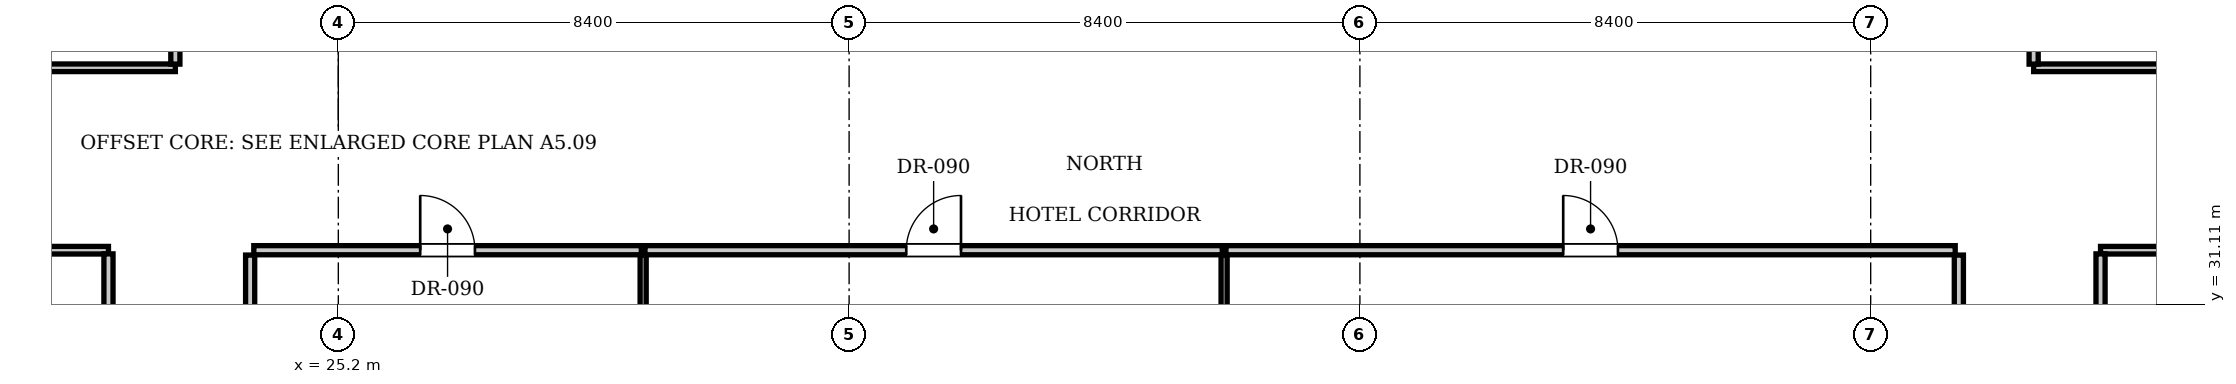
"""IFC4 building model, lengths in metres.
Left out: names, types, materials, properties, quantities, classifications, styles, units other than length and angle.
Written with IfcOpenShell. Run it as: python <this file> out.ifc"""

import sys

from ifc_helpers import new_model, si_unit, direction, frame, frame_2d, origin, place, context, subcontext, project, spatial, rectangle, extrude, element, fill, save


model = new_model("IFC4")
c1 = context("Model", 3, precision=1e-05, world=origin(), true_north=direction((0.0, 1.0)))
c2 = subcontext(c1, "Body", "Model", "MODEL_VIEW")
j1 = project(units=[si_unit("LENGTHUNIT", "METRE"), si_unit("PLANEANGLEUNIT", "RADIAN")], contexts=[c1])
p1 = place(None, origin())
s1 = spatial("IfcSite", under=j1, at=p1, CompositionType="ELEMENT")
p2 = place(p1, origin())
s2 = spatial("IfcBuilding", under=s1, at=p2, CompositionType="ELEMENT")
p3 = place(p2, frame((0.0, 0.0, 111.65)))
s3 = spatial("IfcBuildingStorey", under=s2, at=p3, CompositionType="ELEMENT", Elevation=111.65)
for number, where, z_axis, x_axis in (
    (1, (23.75, 24.19, 0.0), (0.0, 0.0, 1.0), (0.0, 1.0, 0.0)),
    (2, (51.85, 24.19, 0.0), (0.0, 0.0, 1.0), (0.0, 1.0, 0.0)),
):
    element("IfcWall", number, at=place(p3, frame(where, z_axis=z_axis, x_axis=x_axis)), inside=s3, PredefinedType="PARTITIONING", context=c2, shape_type="SweptSolid", body=[
        extrude(rectangle(XDim=7.73, YDim=0.15, at=frame_2d((3.865, 0.0))), origin(), (0.0, 0.0, 1.0), 3.55),
    ])
p4 = place(p3, frame((23.81, 32.0, 0.0), z_axis=(0.0, 0.0, 1.0), x_axis=(1.0, 0.0, 0.0)))
e3 = element("IfcWall", 3, at=p4, inside=s3, PredefinedType="PARTITIONING", context=c2, shape_type="SweptSolid", body=[
    extrude(rectangle(XDim=6.373, YDim=0.15, at=frame_2d((3.187, 0.0))), origin(), (0.0, 0.0, 1.0), 3.55),
])
p5 = place(p4, frame((2.737, 0.0, 0.0)))
e4 = element("IfcOpeningElement", 4, at=p5, cuts=e3, PredefinedType="OPENING", context=c2, shape_type="SweptSolid", body=[
    extrude(rectangle(XDim=0.9, YDim=2.1, at=frame_2d((0.45, 1.05))), frame((0.0, 0.085, 0.0), z_axis=(0.0, -1.0, 0.0), x_axis=(1.0, 0.0, 0.0)), (0.0, 0.0, 1.0), 0.17),
])
p6 = place(p3, frame((30.213, 24.19, 0.0), z_axis=(0.0, 0.0, 1.0), x_axis=(0.0, 1.0, 0.0)))
e5 = element("IfcWall", 5, at=p6, inside=s3, PredefinedType="PARTITIONING", context=c2, shape_type="SweptSolid", body=[
    extrude(rectangle(XDim=7.73, YDim=0.1, at=frame_2d((3.865, 0.0))), origin(), (0.0, 0.0, 1.0), 3.55),
])
p7 = place(p3, frame((30.243, 32.0, 0.0), z_axis=(0.0, 0.0, 1.0), x_axis=(1.0, 0.0, 0.0)))
e6 = element("IfcWall", 6, at=p7, inside=s3, PredefinedType="PARTITIONING", context=c2, shape_type="SweptSolid", body=[
    extrude(rectangle(XDim=9.494, YDim=0.15, at=frame_2d((4.747, 0.0))), origin(), (0.0, 0.0, 1.0), 3.55),
])
p8 = place(p7, frame((4.297, 0.0, 0.0)))
e7 = element("IfcOpeningElement", 7, at=p8, cuts=e6, PredefinedType="OPENING", context=c2, shape_type="SweptSolid", body=[
    extrude(rectangle(XDim=0.9, YDim=2.1, at=frame_2d((0.45, 1.05))), frame((0.0, 0.085, 0.0), z_axis=(0.0, -1.0, 0.0), x_axis=(1.0, 0.0, 0.0)), (0.0, 0.0, 1.0), 0.17),
])
p9 = place(p3, frame((39.767, 24.19, 0.0), z_axis=(0.0, 0.0, 1.0), x_axis=(0.0, 1.0, 0.0)))
e8 = element("IfcWall", 8, at=p9, inside=s3, PredefinedType="PARTITIONING", context=c2, shape_type="SweptSolid", body=[
    extrude(rectangle(XDim=7.73, YDim=0.1, at=frame_2d((3.865, 0.0))), origin(), (0.0, 0.0, 1.0), 3.55),
])
p10 = place(p3, frame((39.797, 32.0, 0.0), z_axis=(0.0, 0.0, 1.0), x_axis=(1.0, 0.0, 0.0)))
e9 = element("IfcWall", 9, at=p10, inside=s3, PredefinedType="PARTITIONING", context=c2, shape_type="SweptSolid", body=[
    extrude(rectangle(XDim=11.993, YDim=0.15, at=frame_2d((5.997, 0.0))), origin(), (0.0, 0.0, 1.0), 3.55),
])
p11 = place(p10, frame((5.546, 0.0, 0.0)))
e10 = element("IfcOpeningElement", 10, at=p11, cuts=e9, PredefinedType="OPENING", context=c2, shape_type="SweptSolid", body=[
    extrude(rectangle(XDim=0.9, YDim=2.1, at=frame_2d((0.45, 1.05))), frame((0.0, 0.085, 0.0), z_axis=(0.0, -1.0, 0.0), x_axis=(1.0, 0.0, 0.0)), (0.0, 0.0, 1.0), 0.17),
])
for number, where, z_axis, x_axis in (
    (11, (10.9, 32.0, 0.0), (0.0, 0.0, 1.0), (1.0, 0.0, 0.0)),
    (12, (54.18, 32.0, 0.0), (0.0, 0.0, 1.0), (1.0, 0.0, 0.0)),
):
    element("IfcWall", number, at=place(p3, frame(where, z_axis=z_axis, x_axis=x_axis)), inside=s3, PredefinedType="PARTITIONING", context=c2, shape_type="SweptSolid", body=[
        extrude(rectangle(XDim=10.52, YDim=0.125, at=frame_2d((5.26, 0.0))), origin(), (0.0, 0.0, 1.0), 3.55),
    ])
p12 = place(p3, frame((21.42, 26.4, 0.0), z_axis=(0.0, 0.0, 1.0), x_axis=(0.0, 1.0, 0.0)))
e13 = element("IfcWall", 13, at=p12, inside=s3, PredefinedType="PARTITIONING", context=c2, shape_type="SweptSolid", body=[
    extrude(rectangle(XDim=5.54, YDim=0.15, at=frame_2d((2.77, 0.0))), origin(), (0.0, 0.0, 1.0), 3.55),
])
p13 = place(p12, frame((2.295, 0.0, 0.0)))
e14 = element("IfcOpeningElement", 14, at=p13, cuts=e13, PredefinedType="OPENING", context=c2, shape_type="SweptSolid", body=[
    extrude(rectangle(XDim=0.95, YDim=2.15, at=frame_2d((0.475, 1.075))), frame((0.0, 0.085, 0.0), z_axis=(0.0, -1.0, 0.0), x_axis=(1.0, 0.0, 0.0)), (0.0, 0.0, 1.0), 0.17),
])
p14 = place(p3, frame((54.18, 26.4, 0.0), z_axis=(0.0, 0.0, 1.0), x_axis=(0.0, 1.0, 0.0)))
e15 = element("IfcWall", 15, at=p14, inside=s3, PredefinedType="PARTITIONING", context=c2, shape_type="SweptSolid", body=[
    extrude(rectangle(XDim=5.54, YDim=0.15, at=frame_2d((2.77, 0.0))), origin(), (0.0, 0.0, 1.0), 3.55),
])
p15 = place(p14, frame((2.295, 0.0, 0.0)))
e16 = element("IfcOpeningElement", 16, at=p15, cuts=e15, PredefinedType="OPENING", context=c2, shape_type="SweptSolid", body=[
    extrude(rectangle(XDim=0.95, YDim=2.15, at=frame_2d((0.475, 1.075))), frame((0.0, 0.085, 0.0), z_axis=(0.0, -1.0, 0.0), x_axis=(1.0, 0.0, 0.0)), (0.0, 0.0, 1.0), 0.17),
])
p16 = place(p3, frame((10.9, 35.0, 0.0), z_axis=(0.0, 0.0, 1.0), x_axis=(1.0, 0.0, 0.0)))
e17 = element("IfcWall", 17, at=p16, inside=s3, PredefinedType="PARTITIONING", context=c2, shape_type="SweptSolid", body=[
    extrude(rectangle(XDim=11.62, YDim=0.125, at=frame_2d((5.81, 0.0))), origin(), (0.0, 0.0, 1.0), 3.55),
])
p17 = place(p3, frame((53.08, 35.0, 0.0), z_axis=(0.0, 0.0, 1.0), x_axis=(1.0, 0.0, 0.0)))
e18 = element("IfcWall", 18, at=p17, inside=s3, PredefinedType="PARTITIONING", context=c2, shape_type="SweptSolid", body=[
    extrude(rectangle(XDim=11.62, YDim=0.125, at=frame_2d((5.81, 0.0))), origin(), (0.0, 0.0, 1.0), 3.55),
])
p18 = place(p3, frame((22.52, 35.06, 0.0), z_axis=(0.0, 0.0, 1.0), x_axis=(0.0, 1.0, 0.0)))
e19 = element("IfcWall", 19, at=p18, inside=s3, PredefinedType="PARTITIONING", context=c2, shape_type="SweptSolid", body=[
    extrude(rectangle(XDim=12.927, YDim=0.15, at=frame_2d((6.464, 0.0))), origin(), (0.0, 0.0, 1.0), 3.55),
])
p19 = place(p18, frame((5.989, 0.0, 0.0)))
e20 = element("IfcOpeningElement", 20, at=p19, cuts=e19, PredefinedType="OPENING", context=c2, shape_type="SweptSolid", body=[
    extrude(rectangle(XDim=0.95, YDim=2.15, at=frame_2d((0.475, 1.075))), frame((0.0, 0.085, 0.0), z_axis=(0.0, -1.0, 0.0), x_axis=(1.0, 0.0, 0.0)), (0.0, 0.0, 1.0), 0.17),
])
p20 = place(p3, frame((53.08, 35.06, 0.0), z_axis=(0.0, 0.0, 1.0), x_axis=(0.0, 1.0, 0.0)))
e21 = element("IfcWall", 21, at=p20, inside=s3, PredefinedType="PARTITIONING", context=c2, shape_type="SweptSolid", body=[
    extrude(rectangle(XDim=12.927, YDim=0.15, at=frame_2d((6.464, 0.0))), origin(), (0.0, 0.0, 1.0), 3.55),
])
p21 = place(p20, frame((5.989, 0.0, 0.0)))
e22 = element("IfcOpeningElement", 22, at=p21, cuts=e21, PredefinedType="OPENING", context=c2, shape_type="SweptSolid", body=[
    extrude(rectangle(XDim=0.95, YDim=2.15, at=frame_2d((0.475, 1.075))), frame((0.0, 0.085, 0.0), z_axis=(0.0, -1.0, 0.0), x_axis=(1.0, 0.0, 0.0)), (0.0, 0.0, 1.0), 0.17),
])
p22 = place(p5, origin())
e23 = element("IfcDoor", 23, at=p22, inside=s3, OperationType="SINGLE_SWING_LEFT", PredefinedType="DOOR", context=c2, shape_type="SweptSolid", body=[
    extrude(rectangle(XDim=0.9, YDim=2.1, at=frame_2d((0.45, 1.05))), frame((0.0, 0.025, 0.0), z_axis=(0.0, -1.0, 0.0), x_axis=(1.0, 0.0, 0.0)), (0.0, 0.0, 1.0), 0.05),
])
fill(e4, e23)
p23 = place(p8, origin())
e24 = element("IfcDoor", 24, at=p23, inside=s3, OperationType="SINGLE_SWING_RIGHT", PredefinedType="DOOR", context=c2, shape_type="SweptSolid", body=[
    extrude(rectangle(XDim=0.9, YDim=2.1, at=frame_2d((0.45, 1.05))), frame((0.0, 0.025, 0.0), z_axis=(0.0, -1.0, 0.0), x_axis=(1.0, 0.0, 0.0)), (0.0, 0.0, 1.0), 0.05),
])
fill(e7, e24)
p24 = place(p11, origin())
e25 = element("IfcDoor", 25, at=p24, inside=s3, OperationType="SINGLE_SWING_LEFT", PredefinedType="DOOR", context=c2, shape_type="SweptSolid", body=[
    extrude(rectangle(XDim=0.9, YDim=2.1, at=frame_2d((0.45, 1.05))), frame((0.0, 0.025, 0.0), z_axis=(0.0, -1.0, 0.0), x_axis=(1.0, 0.0, 0.0)), (0.0, 0.0, 1.0), 0.05),
])
fill(e10, e25)
save(model, sys.argv[1])
